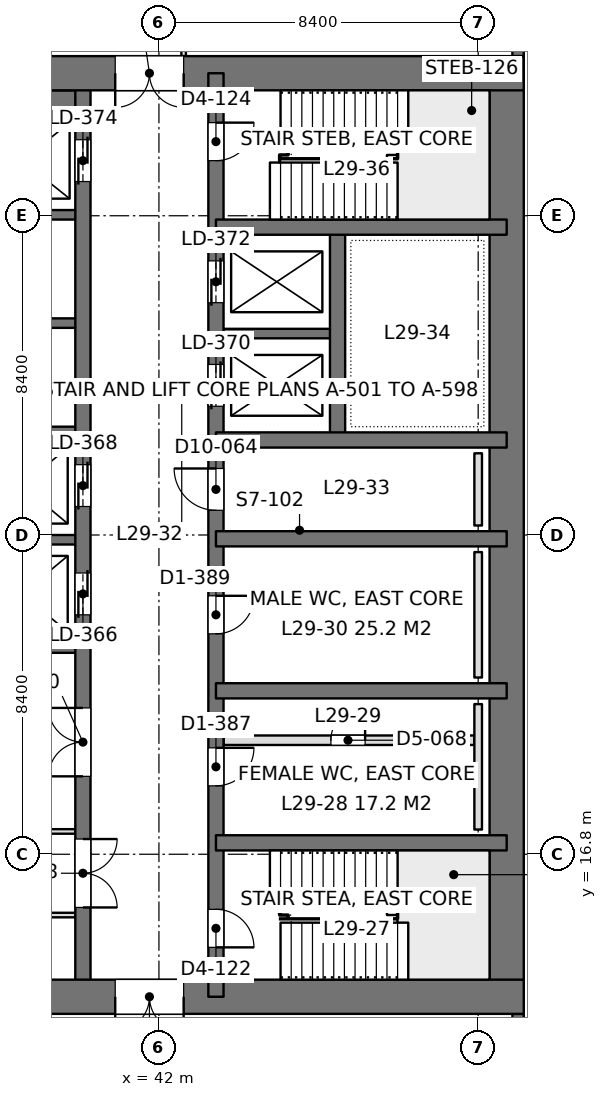
"""IFC4 building model, lengths in metres.
Left out: names, types, materials, properties, quantities, classifications, styles, units other than length and angle.
Written with IfcOpenShell. Run it as: python <this file> out.ifc"""

import sys

from ifc_helpers import new_model, si_unit, direction, frame, frame_2d, origin, place, context, subcontext, project, spatial, rectangle, extrude, element, fill, save


model = new_model("IFC4")
c1 = context("Model", 3, precision=1e-05, world=origin(), true_north=direction((0.0, 1.0)))
c2 = subcontext(c1, "Body", "Model", "MODEL_VIEW")
j1 = project(units=[si_unit("LENGTHUNIT", "METRE"), si_unit("PLANEANGLEUNIT", "RADIAN")], contexts=[c1])
p1 = place(None, origin())
s1 = spatial("IfcSite", under=j1, at=p1, CompositionType="ELEMENT")
p2 = place(p1, origin())
s2 = spatial("IfcBuilding", under=s1, at=p2, CompositionType="ELEMENT")
p3 = place(p2, frame((0.0, 0.0, 130.2)))
s3 = spatial("IfcBuildingStorey", under=s2, at=p3, CompositionType="ELEMENT", Elevation=130.2)
p4 = place(p3, frame((33.6, 13.05, 0.0), z_axis=(0.0, 0.0, 1.0), x_axis=(1.0, 0.0, 0.0)))
e1 = element("IfcWall", 1, at=p4, inside=s3, PredefinedType="SHEAR", context=c2, shape_type="SweptSolid", body=[
    extrude(rectangle(XDim=18.0, YDim=0.9, at=frame_2d((9.0, 0.0))), origin(), (0.0, 0.0, 1.0), 4.2),
])
p5 = place(p4, frame((7.25, 0.0, 0.0)))
e2 = element("IfcOpeningElement", 2, at=p5, cuts=e1, PredefinedType="OPENING", context=c2, shape_type="SweptSolid", body=[
    extrude(rectangle(XDim=1.8, YDim=2.4, at=frame_2d((0.9, 1.2))), frame((0.0, 0.46, 0.0), z_axis=(0.0, -1.0, 0.0), x_axis=(1.0, 0.0, 0.0)), (0.0, 0.0, 1.0), 0.92),
])
p6 = place(p3, frame((33.6, 37.35, 0.0), z_axis=(0.0, 0.0, 1.0), x_axis=(1.0, 0.0, 0.0)))
e3 = element("IfcWall", 3, at=p6, inside=s3, PredefinedType="SHEAR", context=c2, shape_type="SweptSolid", body=[
    extrude(rectangle(XDim=18.0, YDim=0.9, at=frame_2d((9.0, 0.0))), origin(), (0.0, 0.0, 1.0), 4.2),
])
p7 = place(p6, frame((7.25, 0.0, 0.0)))
e4 = element("IfcOpeningElement", 4, at=p7, cuts=e3, PredefinedType="OPENING", context=c2, shape_type="SweptSolid", body=[
    extrude(rectangle(XDim=1.8, YDim=2.4, at=frame_2d((0.9, 1.2))), frame((0.0, 0.46, 0.0), z_axis=(0.0, -1.0, 0.0), x_axis=(1.0, 0.0, 0.0)), (0.0, 0.0, 1.0), 0.92),
])
p8 = place(p3, frame((51.15, 13.05, 0.0), z_axis=(0.0, 0.0, 1.0), x_axis=(0.0, 1.0, 0.0)))
e5 = element("IfcWall", 5, at=p8, inside=s3, PredefinedType="SHEAR", context=c2, shape_type="SweptSolid", body=[
    extrude(rectangle(XDim=24.3, YDim=0.9, at=frame_2d((12.15, 0.0))), origin(), (0.0, 0.0, 1.0), 4.2),
])
p9 = place(p3, frame((43.5, 13.05, 0.0), z_axis=(0.0, 0.0, 1.0), x_axis=(0.0, 1.0, 0.0)))
e6 = element("IfcWall", 6, at=p9, inside=s3, PredefinedType="SHEAR", context=c2, shape_type="SweptSolid", body=[
    extrude(rectangle(XDim=24.3, YDim=0.4, at=frame_2d((12.15, 0.0))), origin(), (0.0, 0.0, 1.0), 4.2),
])
p10 = place(p9, frame((1.3, 0.0, 0.0)))
e7 = element("IfcOpeningElement", 7, at=p10, cuts=e6, PredefinedType="OPENING", context=c2, shape_type="SweptSolid", body=[
    extrude(rectangle(XDim=1.0, YDim=2.2, at=frame_2d((0.5, 1.1))), frame((0.0, 0.21, 0.0), z_axis=(0.0, -1.0, 0.0), x_axis=(1.0, 0.0, 0.0)), (0.0, 0.0, 1.0), 0.42),
])
p11 = place(p9, frame((22.0, 0.0, 0.0)))
e8 = element("IfcOpeningElement", 8, at=p11, cuts=e6, PredefinedType="OPENING", context=c2, shape_type="SweptSolid", body=[
    extrude(rectangle(XDim=1.0, YDim=2.2, at=frame_2d((0.5, 1.1))), frame((0.0, 0.21, 0.0), z_axis=(0.0, -1.0, 0.0), x_axis=(1.0, 0.0, 0.0)), (0.0, 0.0, 1.0), 0.42),
])
p12 = place(p9, frame((5.55, 0.0, 0.0)))
e9 = element("IfcOpeningElement", 9, at=p12, cuts=e6, PredefinedType="OPENING", context=c2, shape_type="SweptSolid", body=[
    extrude(rectangle(XDim=1.0, YDim=2.2, at=frame_2d((0.5, 1.1))), frame((0.0, 0.21, 0.0), z_axis=(0.0, -1.0, 0.0), x_axis=(1.0, 0.0, 0.0)), (0.0, 0.0, 1.0), 0.42),
])
p13 = place(p9, frame((9.55, 0.0, 0.0)))
e10 = element("IfcOpeningElement", 10, at=p13, cuts=e6, PredefinedType="OPENING", context=c2, shape_type="SweptSolid", body=[
    extrude(rectangle(XDim=1.0, YDim=2.2, at=frame_2d((0.5, 1.1))), frame((0.0, 0.21, 0.0), z_axis=(0.0, -1.0, 0.0), x_axis=(1.0, 0.0, 0.0)), (0.0, 0.0, 1.0), 0.42),
])
p14 = place(p9, frame((12.8, 0.0, 0.0)))
e11 = element("IfcOpeningElement", 11, at=p14, cuts=e6, PredefinedType="OPENING", context=c2, shape_type="SweptSolid", body=[
    extrude(rectangle(XDim=1.1, YDim=2.2, at=frame_2d((0.55, 1.1))), frame((0.0, 0.21, 0.0), z_axis=(0.0, -1.0, 0.0), x_axis=(1.0, 0.0, 0.0)), (0.0, 0.0, 1.0), 0.42),
])
p15 = place(p9, frame((15.538, 0.0, 0.0)))
e12 = element("IfcOpeningElement", 12, at=p15, cuts=e6, PredefinedType="OPENING", context=c2, shape_type="SweptSolid", body=[
    extrude(rectangle(XDim=1.1, YDim=2.2, at=frame_2d((0.55, 1.1))), frame((0.0, 0.21, 0.0), z_axis=(0.0, -1.0, 0.0), x_axis=(1.0, 0.0, 0.0)), (0.0, 0.0, 1.0), 0.42),
])
p16 = place(p9, frame((18.262, 0.0, 0.0)))
e13 = element("IfcOpeningElement", 13, at=p16, cuts=e6, PredefinedType="OPENING", context=c2, shape_type="SweptSolid", body=[
    extrude(rectangle(XDim=1.1, YDim=2.2, at=frame_2d((0.55, 1.1))), frame((0.0, 0.21, 0.0), z_axis=(0.0, -1.0, 0.0), x_axis=(1.0, 0.0, 0.0)), (0.0, 0.0, 1.0), 0.42),
])
p17 = place(p3, frame((40.0, 13.05, 0.0), z_axis=(0.0, 0.0, 1.0), x_axis=(0.0, 1.0, 0.0)))
e14 = element("IfcWall", 14, at=p17, inside=s3, PredefinedType="SHEAR", context=c2, shape_type="SweptSolid", body=[
    extrude(rectangle(XDim=24.3, YDim=0.4, at=frame_2d((12.15, 0.0))), origin(), (0.0, 0.0, 1.0), 4.2),
])
p18 = place(p17, frame((10.05, 0.0, 0.0)))
e15 = element("IfcOpeningElement", 15, at=p18, cuts=e14, PredefinedType="OPENING", context=c2, shape_type="SweptSolid", body=[
    extrude(rectangle(XDim=1.1, YDim=2.2, at=frame_2d((0.55, 1.1))), frame((0.0, 0.21, 0.0), z_axis=(0.0, -1.0, 0.0), x_axis=(1.0, 0.0, 0.0)), (0.0, 0.0, 1.0), 0.42),
])
p19 = place(p17, frame((12.9, 0.0, 0.0)))
e16 = element("IfcOpeningElement", 16, at=p19, cuts=e14, PredefinedType="OPENING", context=c2, shape_type="SweptSolid", body=[
    extrude(rectangle(XDim=1.1, YDim=2.2, at=frame_2d((0.55, 1.1))), frame((0.0, 0.21, 0.0), z_axis=(0.0, -1.0, 0.0), x_axis=(1.0, 0.0, 0.0)), (0.0, 0.0, 1.0), 0.42),
])
p20 = place(p17, frame((21.45, 0.0, 0.0)))
e17 = element("IfcOpeningElement", 17, at=p20, cuts=e14, PredefinedType="OPENING", context=c2, shape_type="SweptSolid", body=[
    extrude(rectangle(XDim=1.1, YDim=2.2, at=frame_2d((0.55, 1.1))), frame((0.0, 0.21, 0.0), z_axis=(0.0, -1.0, 0.0), x_axis=(1.0, 0.0, 0.0)), (0.0, 0.0, 1.0), 0.42),
])
p21 = place(p17, frame((2.35, 0.0, 0.0)))
e18 = element("IfcOpeningElement", 18, at=p21, cuts=e14, PredefinedType="OPENING", context=c2, shape_type="SweptSolid", body=[
    extrude(rectangle(XDim=1.8, YDim=2.4, at=frame_2d((0.9, 1.2))), frame((0.0, 0.21, 0.0), z_axis=(0.0, -1.0, 0.0), x_axis=(1.0, 0.0, 0.0)), (0.0, 0.0, 1.0), 0.42),
])
p22 = place(p17, frame((5.8, 0.0, 0.0)))
e19 = element("IfcOpeningElement", 19, at=p22, cuts=e14, PredefinedType="OPENING", context=c2, shape_type="SweptSolid", body=[
    extrude(rectangle(XDim=1.8, YDim=2.4, at=frame_2d((0.9, 1.2))), frame((0.0, 0.21, 0.0), z_axis=(0.0, -1.0, 0.0), x_axis=(1.0, 0.0, 0.0)), (0.0, 0.0, 1.0), 0.42),
])
for number, where, z_axis, x_axis in (
    (20, (51.15, 17.1, 0.0), (0.0, 0.0, 1.0), (-1.0, 0.0, 0.0)),
    (21, (51.15, 21.1, 0.0), (0.0, 0.0, 1.0), (-1.0, 0.0, 0.0)),
    (22, (51.15, 25.1, 0.0), (0.0, 0.0, 1.0), (-1.0, 0.0, 0.0)),
    (23, (51.15, 27.7, 0.0), (0.0, 0.0, 1.0), (-1.0, 0.0, 0.0)),
    (24, (51.15, 33.3, 0.0), (0.0, 0.0, 1.0), (-1.0, 0.0, 0.0)),
):
    element("IfcWall", number, at=place(p3, frame(where, z_axis=z_axis, x_axis=x_axis)), inside=s3, PredefinedType="SHEAR", context=c2, shape_type="SweptSolid", body=[
        extrude(rectangle(XDim=7.65, YDim=0.4, at=frame_2d((3.825, 0.0))), origin(), (0.0, 0.0, 1.0), 4.2),
    ])
p23 = place(p3, frame((46.7, 27.7, 0.0), z_axis=(0.0, 0.0, 1.0), x_axis=(0.0, 1.0, 0.0)))
e25 = element("IfcWall", 25, at=p23, inside=s3, PredefinedType="SHEAR", context=c2, shape_type="SweptSolid", body=[
    extrude(rectangle(XDim=5.6, YDim=0.4, at=frame_2d((2.8, 0.0))), origin(), (0.0, 0.0, 1.0), 4.2),
])
p24 = place(p3, frame((46.7, 30.5, 0.0), z_axis=(0.0, 0.0, 1.0), x_axis=(-1.0, 0.0, 0.0)))
e26 = element("IfcWall", 26, at=p24, inside=s3, PredefinedType="SHEAR", context=c2, shape_type="SweptSolid", body=[
    extrude(rectangle(XDim=3.2, YDim=0.25, at=frame_2d((1.6, 0.0))), origin(), (0.0, 0.0, 1.0), 4.2),
])
p25 = place(p3, frame((40.0, 22.225, 0.0), z_axis=(0.0, 0.0, 1.0), x_axis=(-1.0, 0.0, 0.0)))
e27 = element("IfcWall", 27, at=p25, inside=s3, PredefinedType="SHEAR", context=c2, shape_type="SweptSolid", body=[
    extrude(rectangle(XDim=5.95, YDim=0.25, at=frame_2d((2.975, 0.0))), origin(), (0.0, 0.0, 1.0), 4.2),
])
for number, where, z_axis, x_axis in (
    (28, (40.0, 25.075, 0.0), (0.0, 0.0, 1.0), (-1.0, 0.0, 0.0)),
    (29, (40.0, 27.925, 0.0), (0.0, 0.0, 1.0), (-1.0, 0.0, 0.0)),
    (30, (40.0, 30.775, 0.0), (0.0, 0.0, 1.0), (-1.0, 0.0, 0.0)),
    (31, (40.0, 33.625, 0.0), (0.0, 0.0, 1.0), (-1.0, 0.0, 0.0)),
):
    element("IfcWall", number, at=place(p3, frame(where, z_axis=z_axis, x_axis=x_axis)), inside=s3, PredefinedType="SHEAR", context=c2, shape_type="SweptSolid", body=[
        extrude(rectangle(XDim=3.2, YDim=0.25, at=frame_2d((1.6, 0.0))), origin(), (0.0, 0.0, 1.0), 4.2),
    ])
p26 = place(p3, frame((40.0, 36.625, 0.0), z_axis=(0.0, 0.0, 1.0), x_axis=(-1.0, 0.0, 0.0)))
e32 = element("IfcWall", 32, at=p26, inside=s3, PredefinedType="SHEAR", context=c2, shape_type="SweptSolid", body=[
    extrude(rectangle(XDim=3.2, YDim=0.55, at=frame_2d((1.6, 0.0))), origin(), (0.0, 0.0, 1.0), 4.2),
])
p27 = place(p3, frame((51.45, 42.0, 0.0), z_axis=(0.0, 0.0, 1.0), x_axis=(0.0, -1.0, 0.0)))
e33 = element("IfcWall", 33, at=p27, inside=s3, PredefinedType="SOLIDWALL", context=c2, shape_type="SweptSolid", body=[
    extrude(rectangle(XDim=4.2, YDim=0.3, at=frame_2d((2.1, 0.0))), origin(), (0.0, 0.0, 1.0), 4.05),
])
p28 = place(p27, frame((0.9, 0.0, 0.9)))
e34 = element("IfcOpeningElement", 34, at=p28, cuts=e33, PredefinedType="OPENING", context=c2, shape_type="SweptSolid", body=[
    extrude(rectangle(XDim=2.4, YDim=1.9, at=frame_2d((1.2, 0.95))), frame((0.0, 0.16, 0.0), z_axis=(0.0, -1.0, 0.0), x_axis=(1.0, 0.0, 0.0)), (0.0, 0.0, 1.0), 0.32),
])
p29 = place(p3, frame((51.45, 12.6, 0.0), z_axis=(0.0, 0.0, 1.0), x_axis=(0.0, -1.0, 0.0)))
e35 = element("IfcWall", 35, at=p29, inside=s3, PredefinedType="SOLIDWALL", context=c2, shape_type="SweptSolid", body=[
    extrude(rectangle(XDim=4.2, YDim=0.3, at=frame_2d((2.1, 0.0))), origin(), (0.0, 0.0, 1.0), 4.05),
])
p30 = place(p29, frame((0.9, 0.0, 0.9)))
e36 = element("IfcOpeningElement", 36, at=p30, cuts=e35, PredefinedType="OPENING", context=c2, shape_type="SweptSolid", body=[
    extrude(rectangle(XDim=2.4, YDim=1.9, at=frame_2d((1.2, 0.95))), frame((0.0, 0.16, 0.0), z_axis=(0.0, -1.0, 0.0), x_axis=(1.0, 0.0, 0.0)), (0.0, 0.0, 1.0), 0.32),
])
p31 = place(p3, frame((33.898, 17.4, 0.0), z_axis=(0.0, 0.0, 1.0), x_axis=(1.0, 0.0, 0.0)))
e37 = element("IfcWall", 37, at=p31, inside=s3, PredefinedType="PARTITIONING", context=c2, shape_type="SweptSolid", body=[
    extrude(rectangle(XDim=5.904, YDim=0.12, at=frame_2d((2.952, 0.0))), origin(), (0.0, 0.0, 1.0), 3.55),
])
p32 = place(p31, frame((0.38, 0.0, 0.0)))
e38 = element("IfcOpeningElement", 38, at=p32, cuts=e37, PredefinedType="OPENING", context=c2, shape_type="SweptSolid", body=[
    extrude(rectangle(XDim=1.0, YDim=2.4, at=frame_2d((0.5, 1.2))), frame((0.0, 0.07, 0.0), z_axis=(0.0, -1.0, 0.0), x_axis=(1.0, 0.0, 0.0)), (0.0, 0.0, 1.0), 0.14),
])
p33 = place(p3, frame((33.598, 15.2, 0.0), z_axis=(0.0, 0.0, 1.0), x_axis=(1.0, 0.0, 0.0)))
e39 = element("IfcWall", 39, at=p33, inside=s3, PredefinedType="PARTITIONING", context=c2, shape_type="SweptSolid", body=[
    extrude(rectangle(XDim=6.204, YDim=0.12, at=frame_2d((3.102, 0.0))), origin(), (0.0, 0.0, 1.0), 3.55),
])
p34 = place(p3, frame((42.65, 37.8, 0.0), z_axis=(0.0, 0.0, 1.0), x_axis=(0.0, 1.0, 0.0)))
e40 = element("IfcWall", 40, at=p34, inside=s3, PredefinedType="PARTITIONING", context=c2, shape_type="SweptSolid", body=[
    extrude(rectangle(XDim=2.0, YDim=0.12, at=frame_2d((1.0, 0.0))), origin(), (0.0, 0.0, 1.0), 4.05),
])
p35 = place(p3, frame((43.7, 19.8, 0.0), z_axis=(0.0, 0.0, 1.0), x_axis=(1.0, 0.0, 0.0)))
e41 = element("IfcWall", 41, at=p35, inside=s3, PredefinedType="PARTITIONING", context=c2, shape_type="SweptSolid", body=[
    extrude(rectangle(XDim=6.6, YDim=0.25, at=frame_2d((3.3, 0.0))), origin(), (0.0, 0.0, 1.0), 4.0),
])
p36 = place(p35, frame((2.825, 0.0, 0.0)))
e42 = element("IfcOpeningElement", 42, at=p36, cuts=e41, PredefinedType="OPENING", context=c2, shape_type="SweptSolid", body=[
    extrude(rectangle(XDim=0.9, YDim=2.2, at=frame_2d((0.45, 1.1))), frame((0.0, 0.135, 0.0), z_axis=(0.0, -1.0, 0.0), x_axis=(1.0, 0.0, 0.0)), (0.0, 0.0, 1.0), 0.27),
])
for number, where, z_axis, x_axis in (
    (43, (50.4, 17.45, 0.0), (0.0, 0.0, 1.0), (0.0, 1.0, 0.0)),
    (44, (50.4, 21.45, 0.0), (0.0, 0.0, 1.0), (0.0, 1.0, 0.0)),
):
    element("IfcWall", number, at=place(p3, frame(where, z_axis=z_axis, x_axis=x_axis)), inside=s3, PredefinedType="PLUMBINGWALL", context=c2, shape_type="SweptSolid", body=[
        extrude(rectangle(XDim=3.3, YDim=0.2, at=frame_2d((1.65, 0.0))), origin(), (0.0, 0.0, 1.0), 1.2),
    ])
p37 = place(p3, frame((50.4, 25.45, 0.0), z_axis=(0.0, 0.0, 1.0), x_axis=(0.0, 1.0, 0.0)))
e45 = element("IfcWall", 45, at=p37, inside=s3, PredefinedType="PLUMBINGWALL", context=c2, shape_type="SweptSolid", body=[
    extrude(rectangle(XDim=1.9, YDim=0.2, at=frame_2d((0.95, 0.0))), origin(), (0.0, 0.0, 1.0), 1.2),
])
p38 = place(p5, frame((1.8, 0.0, 0.0), z_axis=(0.0, 0.0, 1.0), x_axis=(-1.0, 0.0, 0.0)))
e46 = element("IfcDoor", 46, at=p38, inside=s3, OperationType="DOUBLE_DOOR_SINGLE_SWING", PredefinedType="DOOR", context=c2, shape_type="SweptSolid", body=[
    extrude(rectangle(XDim=1.8, YDim=2.4, at=frame_2d((0.9, 1.2))), frame((0.0, 0.025, 0.0), z_axis=(0.0, -1.0, 0.0), x_axis=(1.0, 0.0, 0.0)), (0.0, 0.0, 1.0), 0.05),
])
fill(e2, e46)
p39 = place(p7, frame((1.8, 0.0, 0.0), z_axis=(0.0, 0.0, 1.0), x_axis=(-1.0, 0.0, 0.0)))
e47 = element("IfcDoor", 47, at=p39, inside=s3, OperationType="DOUBLE_DOOR_SINGLE_SWING", PredefinedType="DOOR", context=c2, shape_type="SweptSolid", body=[
    extrude(rectangle(XDim=1.8, YDim=2.4, at=frame_2d((0.9, 1.2))), frame((0.0, 0.025, 0.0), z_axis=(0.0, -1.0, 0.0), x_axis=(1.0, 0.0, 0.0)), (0.0, 0.0, 1.0), 0.05),
])
fill(e4, e47)
p40 = place(p10, frame((1.0, 0.0, 0.0), z_axis=(0.0, 0.0, 1.0), x_axis=(-1.0, 0.0, 0.0)))
e48 = element("IfcDoor", 48, at=p40, inside=s3, OperationType="SINGLE_SWING_RIGHT", PredefinedType="DOOR", context=c2, shape_type="SweptSolid", body=[
    extrude(rectangle(XDim=1.0, YDim=2.2, at=frame_2d((0.5, 1.1))), frame((0.0, 0.025, 0.0), z_axis=(0.0, -1.0, 0.0), x_axis=(1.0, 0.0, 0.0)), (0.0, 0.0, 1.0), 0.05),
])
fill(e7, e48)
p41 = place(p11, frame((1.0, 0.0, 0.0), z_axis=(0.0, 0.0, 1.0), x_axis=(-1.0, 0.0, 0.0)))
e49 = element("IfcDoor", 49, at=p41, inside=s3, OperationType="SINGLE_SWING_LEFT", PredefinedType="DOOR", context=c2, shape_type="SweptSolid", body=[
    extrude(rectangle(XDim=1.0, YDim=2.2, at=frame_2d((0.5, 1.1))), frame((0.0, 0.025, 0.0), z_axis=(0.0, -1.0, 0.0), x_axis=(1.0, 0.0, 0.0)), (0.0, 0.0, 1.0), 0.05),
])
fill(e8, e49)
p42 = place(p12, frame((1.0, 0.0, 0.0), z_axis=(0.0, 0.0, 1.0), x_axis=(-1.0, 0.0, 0.0)))
e50 = element("IfcDoor", 50, at=p42, inside=s3, OperationType="SINGLE_SWING_LEFT", PredefinedType="DOOR", context=c2, shape_type="SweptSolid", body=[
    extrude(rectangle(XDim=1.0, YDim=2.2, at=frame_2d((0.5, 1.1))), frame((0.0, 0.025, 0.0), z_axis=(0.0, -1.0, 0.0), x_axis=(1.0, 0.0, 0.0)), (0.0, 0.0, 1.0), 0.05),
])
fill(e9, e50)
p43 = place(p13, frame((1.0, 0.0, 0.0), z_axis=(0.0, 0.0, 1.0), x_axis=(-1.0, 0.0, 0.0)))
e51 = element("IfcDoor", 51, at=p43, inside=s3, OperationType="SINGLE_SWING_LEFT", PredefinedType="DOOR", context=c2, shape_type="SweptSolid", body=[
    extrude(rectangle(XDim=1.0, YDim=2.2, at=frame_2d((0.5, 1.1))), frame((0.0, 0.025, 0.0), z_axis=(0.0, -1.0, 0.0), x_axis=(1.0, 0.0, 0.0)), (0.0, 0.0, 1.0), 0.05),
])
fill(e10, e51)
p44 = place(p14, origin())
e52 = element("IfcDoor", 52, at=p44, inside=s3, OperationType="SINGLE_SWING_RIGHT", PredefinedType="DOOR", context=c2, shape_type="SweptSolid", body=[
    extrude(rectangle(XDim=1.1, YDim=2.2, at=frame_2d((0.55, 1.1))), frame((0.0, 0.025, 0.0), z_axis=(0.0, -1.0, 0.0), x_axis=(1.0, 0.0, 0.0)), (0.0, 0.0, 1.0), 0.05),
])
fill(e11, e52)
p45 = place(p18, origin())
e53 = element("IfcDoor", 53, at=p45, inside=s3, OperationType="DOUBLE_DOOR_SLIDING", PredefinedType="DOOR", context=c2, shape_type="SweptSolid", body=[
    extrude(rectangle(XDim=1.1, YDim=2.2, at=frame_2d((0.55, 1.1))), frame((0.0, 0.025, 0.0), z_axis=(0.0, -1.0, 0.0), x_axis=(1.0, 0.0, 0.0)), (0.0, 0.0, 1.0), 0.05),
])
fill(e15, e53)
p46 = place(p19, origin())
e54 = element("IfcDoor", 54, at=p46, inside=s3, OperationType="DOUBLE_DOOR_SLIDING", PredefinedType="DOOR", context=c2, shape_type="SweptSolid", body=[
    extrude(rectangle(XDim=1.1, YDim=2.2, at=frame_2d((0.55, 1.1))), frame((0.0, 0.025, 0.0), z_axis=(0.0, -1.0, 0.0), x_axis=(1.0, 0.0, 0.0)), (0.0, 0.0, 1.0), 0.05),
])
fill(e16, e54)
p47 = place(p20, origin())
e55 = element("IfcDoor", 55, at=p47, inside=s3, OperationType="DOUBLE_DOOR_SLIDING", PredefinedType="DOOR", context=c2, shape_type="SweptSolid", body=[
    extrude(rectangle(XDim=1.1, YDim=2.2, at=frame_2d((0.55, 1.1))), frame((0.0, 0.025, 0.0), z_axis=(0.0, -1.0, 0.0), x_axis=(1.0, 0.0, 0.0)), (0.0, 0.0, 1.0), 0.05),
])
fill(e17, e55)
p48 = place(p15, origin())
e56 = element("IfcDoor", 56, at=p48, inside=s3, OperationType="DOUBLE_DOOR_SLIDING", PredefinedType="DOOR", context=c2, shape_type="SweptSolid", body=[
    extrude(rectangle(XDim=1.1, YDim=2.2, at=frame_2d((0.55, 1.1))), frame((0.0, 0.025, 0.0), z_axis=(0.0, -1.0, 0.0), x_axis=(1.0, 0.0, 0.0)), (0.0, 0.0, 1.0), 0.05),
])
fill(e12, e56)
p49 = place(p16, origin())
e57 = element("IfcDoor", 57, at=p49, inside=s3, OperationType="DOUBLE_DOOR_SLIDING", PredefinedType="DOOR", context=c2, shape_type="SweptSolid", body=[
    extrude(rectangle(XDim=1.1, YDim=2.2, at=frame_2d((0.55, 1.1))), frame((0.0, 0.025, 0.0), z_axis=(0.0, -1.0, 0.0), x_axis=(1.0, 0.0, 0.0)), (0.0, 0.0, 1.0), 0.05),
])
fill(e13, e57)
p50 = place(p21, frame((1.8, 0.0, 0.0), z_axis=(0.0, 0.0, 1.0), x_axis=(-1.0, 0.0, 0.0)))
e58 = element("IfcDoor", 58, at=p50, inside=s3, OperationType="DOUBLE_DOOR_SINGLE_SWING", PredefinedType="DOOR", context=c2, shape_type="SweptSolid", body=[
    extrude(rectangle(XDim=1.8, YDim=2.4, at=frame_2d((0.9, 1.2))), frame((0.0, 0.025, 0.0), z_axis=(0.0, -1.0, 0.0), x_axis=(1.0, 0.0, 0.0)), (0.0, 0.0, 1.0), 0.05),
])
fill(e18, e58)
p51 = place(p22, origin())
e59 = element("IfcDoor", 59, at=p51, inside=s3, OperationType="DOUBLE_DOOR_SINGLE_SWING", PredefinedType="DOOR", context=c2, shape_type="SweptSolid", body=[
    extrude(rectangle(XDim=1.8, YDim=2.4, at=frame_2d((0.9, 1.2))), frame((0.0, 0.025, 0.0), z_axis=(0.0, -1.0, 0.0), x_axis=(1.0, 0.0, 0.0)), (0.0, 0.0, 1.0), 0.05),
])
fill(e19, e59)
p52 = place(p36, origin())
e60 = element("IfcDoor", 60, at=p52, inside=s3, OperationType="SINGLE_SWING_RIGHT", PredefinedType="DOOR", context=c2, shape_type="SweptSolid", body=[
    extrude(rectangle(XDim=0.9, YDim=2.2, at=frame_2d((0.45, 1.1))), frame((0.0, 0.025, 0.0), z_axis=(0.0, -1.0, 0.0), x_axis=(1.0, 0.0, 0.0)), (0.0, 0.0, 1.0), 0.05),
])
fill(e42, e60)
save(model, sys.argv[1])
